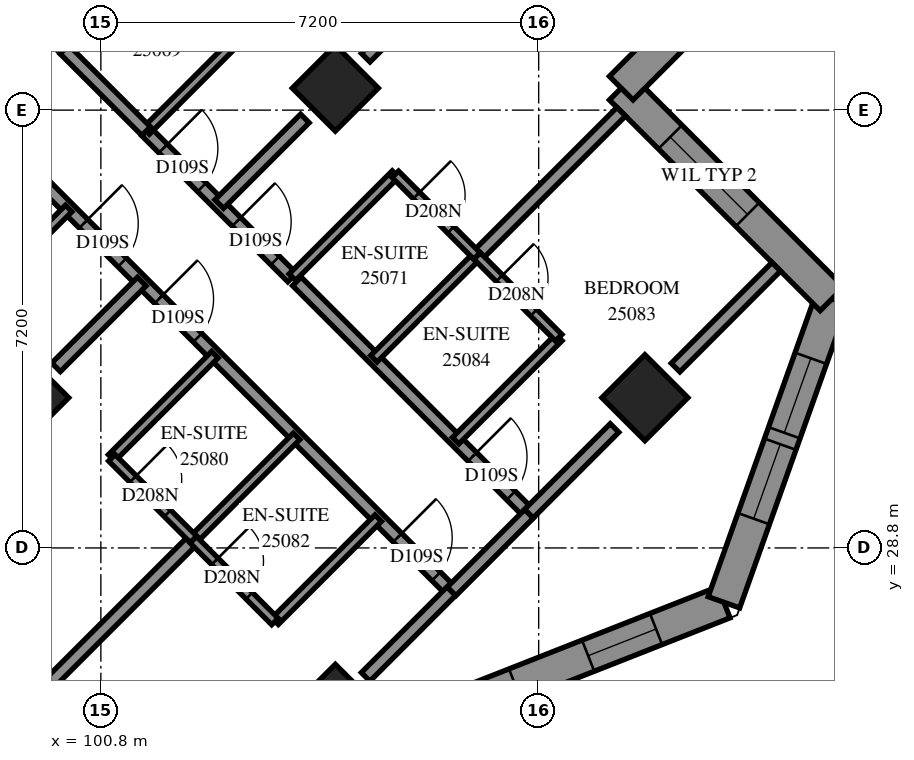
"""IFC4 building model, lengths in metres.
Left out: names, types, materials, properties, quantities, classifications, styles, units other than length and angle.
Written with IfcOpenShell. Run it as: python <this file> out.ifc"""

import sys

from ifc_helpers import new_model, si_unit, direction, frame, frame_2d, origin, origin_2d, place, context, subcontext, project, spatial, polyline, rectangle, outline, extrude, element, fill, save


model = new_model("IFC4")
c1 = context("Model", 3, precision=1e-05, world=origin(), true_north=direction((0.0, 1.0)))
c2 = subcontext(c1, "Body", "Model", "MODEL_VIEW")
j1 = project(units=[si_unit("LENGTHUNIT", "METRE"), si_unit("PLANEANGLEUNIT", "RADIAN")], contexts=[c1])
p1 = place(None, origin())
s1 = spatial("IfcSite", under=j1, at=p1, CompositionType="ELEMENT")
p2 = place(p1, origin())
s2 = spatial("IfcBuilding", under=s1, at=p2, CompositionType="ELEMENT")
p3 = place(p2, frame((0.0, 0.0, 94.8)))
s3 = spatial("IfcBuildingStorey", under=s2, at=p3, CompositionType="ELEMENT", Elevation=94.8)
for number, where, z_axis, x_axis in (
    (1, (104.656, 36.362, 0.0), (0.0, 0.0, 1.0), (0.707, -0.707, 0.0)),
    (2, (99.565, 31.271, 0.0), (0.0, 0.0, 1.0), (0.707, -0.707, 0.0)),
    (3, (109.747, 31.271, 0.0), (0.0, 0.0, 1.0), (0.707, -0.707, 0.0)),
    (4, (104.656, 26.18, 0.0), (0.0, 0.0, 1.0), (0.707, -0.707, 0.0)),
):
    element("IfcColumn", number, at=place(p3, frame(where, z_axis=z_axis, x_axis=x_axis)), inside=s3, PredefinedType="COLUMN", context=c2, shape_type="SweptSolid", body=[
        extrude(rectangle(XDim=1.0, YDim=1.0, at=origin_2d()), origin(), (0.0, 0.0, 1.0), 3.1),
    ])
p4 = place(p3, frame((105.921, 25.889, 0.0), z_axis=(0.0, 0.0, 1.0), x_axis=(0.9305394819, 0.3661915791, 0.0)))
e5 = element("IfcWall", 5, at=p4, inside=s3, PredefinedType="SOLIDWALL", context=c2, shape_type="SweptSolid", body=[
    extrude(outline(polyline([(0.12, -0.275), (5.633, -0.275), (5.383, 0.275), (-0.12, 0.275), (0.12, -0.275)])), origin(), (0.0, 0.0, 1.0), 3.1),
])
p5 = place(p4, frame((0.617, 0.0, 0.5)))
e6 = element("IfcOpeningElement", 6, at=p5, cuts=e5, PredefinedType="OPENING", context=c2, shape_type="SweptSolid", body=[
    extrude(rectangle(XDim=1.2, YDim=2.45, at=frame_2d((0.6, 1.225))), frame((0.0, 0.285, 0.0), z_axis=(0.0, -1.0, 0.0), x_axis=(1.0, 0.0, 0.0)), (0.0, 0.0, 1.0), 0.57),
])
p6 = place(p4, frame((3.108, 0.0, 0.5)))
e7 = element("IfcOpeningElement", 7, at=p6, cuts=e5, PredefinedType="OPENING", context=c2, shape_type="SweptSolid", body=[
    extrude(rectangle(XDim=1.2, YDim=2.45, at=frame_2d((0.6, 1.225))), frame((0.0, 0.285, 0.0), z_axis=(0.0, -1.0, 0.0), x_axis=(1.0, 0.0, 0.0)), (0.0, 0.0, 1.0), 0.57),
])
p7 = place(p3, frame((111.046, 27.906, 0.0), z_axis=(0.0, 0.0, 1.0), x_axis=(0.3355027217, 0.9420392368, 0.0)))
e8 = element("IfcWall", 8, at=p7, inside=s3, PredefinedType="SOLIDWALL", context=c2, shape_type="SweptSolid", body=[
    extrude(outline(polyline([(-0.125, -0.275), (5.471, -0.275), (5.123, 0.275), (0.125, 0.275), (-0.125, -0.275)])), origin(), (0.0, 0.0, 1.0), 3.1),
])
p8 = place(p7, frame((1.46, 0.0, 0.5)))
e9 = element("IfcOpeningElement", 9, at=p8, cuts=e8, PredefinedType="OPENING", context=c2, shape_type="SweptSolid", body=[
    extrude(rectangle(XDim=1.3, YDim=2.45, at=frame_2d((0.65, 1.225))), frame((0.0, 0.285, 0.0), z_axis=(0.0, -1.0, 0.0), x_axis=(1.0, 0.0, 0.0)), (0.0, 0.0, 1.0), 0.57),
])
p9 = place(p7, frame((2.96, 0.0, 0.5)))
e10 = element("IfcOpeningElement", 10, at=p9, cuts=e8, PredefinedType="OPENING", context=c2, shape_type="SweptSolid", body=[
    extrude(rectangle(XDim=1.3, YDim=2.45, at=frame_2d((0.65, 1.225))), frame((0.0, 0.285, 0.0), z_axis=(0.0, -1.0, 0.0), x_axis=(1.0, 0.0, 0.0)), (0.0, 0.0, 1.0), 0.57),
])
p10 = place(p3, frame((112.824, 32.896, 0.0), z_axis=(0.0, 0.0, 1.0), x_axis=(-0.7071067812, 0.7071067812, 0.0)))
e11 = element("IfcWall", 11, at=p10, inside=s3, PredefinedType="SOLIDWALL", context=c2, shape_type="SweptSolid", body=[
    extrude(outline(polyline([(-0.174, -0.275), (4.626, -0.275), (5.176, 0.275), (0.174, 0.275), (-0.174, -0.275)])), origin(), (0.0, 0.0, 1.0), 3.1),
])
p11 = place(p10, frame((1.964, 0.0, 0.6)))
e12 = element("IfcOpeningElement", 12, at=p11, cuts=e11, PredefinedType="OPENING", context=c2, shape_type="SweptSolid", body=[
    extrude(rectangle(XDim=1.8, YDim=1.9, at=frame_2d((0.9, 0.95))), frame((0.0, 0.285, 0.0), z_axis=(0.0, -1.0, 0.0), x_axis=(1.0, 0.0, 0.0)), (0.0, 0.0, 1.0), 0.57),
])
p12 = place(p3, frame((109.358, 36.362, 0.0), z_axis=(0.0, 0.0, 1.0), x_axis=(0.7071067812, 0.7071067812, 0.0)))
e13 = element("IfcWall", 13, at=p12, inside=s3, PredefinedType="SOLIDWALL", context=c2, shape_type="SweptSolid", body=[
    extrude(outline(polyline([(0.275, -0.275), (6.096, -0.275), (5.357, 0.275), (-0.275, 0.275), (0.275, -0.275)])), origin(), (0.0, 0.0, 1.0), 3.1),
])
p13 = place(p12, frame((1.137, 0.0, 0.6)))
e14 = element("IfcOpeningElement", 14, at=p13, cuts=e13, PredefinedType="OPENING", context=c2, shape_type="SweptSolid", body=[
    extrude(rectangle(XDim=1.8, YDim=1.9, at=frame_2d((0.9, 0.95))), frame((0.0, 0.285, 0.0), z_axis=(0.0, -1.0, 0.0), x_axis=(1.0, 0.0, 0.0)), (0.0, 0.0, 1.0), 0.57),
])
p14 = place(p3, frame((93.339, 41.309, 0.0), z_axis=(0.0, 0.0, 1.0), x_axis=(0.7071067812, -0.7071067812, 0.0)))
e15 = element("IfcWall", 15, at=p14, inside=s3, PredefinedType="PARTITIONING", context=c2, shape_type="SweptSolid", body=[
    extrude(rectangle(XDim=18.702, YDim=0.2, at=frame_2d((9.351, 0.0))), origin(), (0.0, 0.0, 1.0), 3.1),
])
p15 = place(p14, frame((3.05, 0.0, 0.0)))
e16 = element("IfcOpeningElement", 16, at=p15, cuts=e15, PredefinedType="OPENING", context=c2, shape_type="SweptSolid", body=[
    extrude(rectangle(XDim=0.9, YDim=2.1, at=frame_2d((0.45, 1.05))), frame((0.0, 0.11, 0.0), z_axis=(0.0, -1.0, 0.0), x_axis=(1.0, 0.0, 0.0)), (0.0, 0.0, 1.0), 0.22),
])
p16 = place(p14, frame((4.7, 0.0, 0.0)))
e17 = element("IfcOpeningElement", 17, at=p16, cuts=e15, PredefinedType="OPENING", context=c2, shape_type="SweptSolid", body=[
    extrude(rectangle(XDim=0.9, YDim=2.1, at=frame_2d((0.45, 1.05))), frame((0.0, 0.11, 0.0), z_axis=(0.0, -1.0, 0.0), x_axis=(1.0, 0.0, 0.0)), (0.0, 0.0, 1.0), 0.22),
])
p17 = place(p14, frame((10.149, 0.0, 0.0)))
e18 = element("IfcOpeningElement", 18, at=p17, cuts=e15, PredefinedType="OPENING", context=c2, shape_type="SweptSolid", body=[
    extrude(rectangle(XDim=0.9, YDim=2.1, at=frame_2d((0.45, 1.05))), frame((0.0, 0.11, 0.0), z_axis=(0.0, -1.0, 0.0), x_axis=(1.0, 0.0, 0.0)), (0.0, 0.0, 1.0), 0.22),
])
p18 = place(p14, frame((11.9, 0.0, 0.0)))
e19 = element("IfcOpeningElement", 19, at=p18, cuts=e15, PredefinedType="OPENING", context=c2, shape_type="SweptSolid", body=[
    extrude(rectangle(XDim=0.9, YDim=2.1, at=frame_2d((0.45, 1.05))), frame((0.0, 0.11, 0.0), z_axis=(0.0, -1.0, 0.0), x_axis=(1.0, 0.0, 0.0)), (0.0, 0.0, 1.0), 0.22),
])
p19 = place(p14, frame((17.45, 0.0, 0.0)))
e20 = element("IfcOpeningElement", 20, at=p19, cuts=e15, PredefinedType="OPENING", context=c2, shape_type="SweptSolid", body=[
    extrude(rectangle(XDim=0.9, YDim=2.1, at=frame_2d((0.45, 1.05))), frame((0.0, 0.11, 0.0), z_axis=(0.0, -1.0, 0.0), x_axis=(1.0, 0.0, 0.0)), (0.0, 0.0, 1.0), 0.22),
])
p20 = place(p3, frame((96.496, 23.113, 0.0), z_axis=(0.0, 0.0, 1.0), x_axis=(0.7071067812, 0.7071067812, 0.0)))
e21 = element("IfcWall", 21, at=p20, inside=s3, PredefinedType="PARTITIONING", context=c2, shape_type="SweptSolid", body=[
    extrude(rectangle(XDim=8.24, YDim=0.2, at=frame_2d((4.12, 0.0))), origin(), (0.0, 0.0, 1.0), 3.1),
])
p21 = place(p3, frame((94.62, 42.587, 0.0), z_axis=(0.0, 0.0, 1.0), x_axis=(0.7071067812, -0.7071067812, 0.0)))
e22 = element("IfcWall", 22, at=p21, inside=s3, PredefinedType="PARTITIONING", context=c2, shape_type="SweptSolid", body=[
    extrude(rectangle(XDim=7.9, YDim=0.2, at=frame_2d((3.95, 0.0))), origin(), (0.0, 0.0, 1.0), 3.1),
])
p22 = place(p21, frame((2.998, 0.0, 0.0)))
e23 = element("IfcOpeningElement", 23, at=p22, cuts=e22, PredefinedType="OPENING", context=c2, shape_type="SweptSolid", body=[
    extrude(rectangle(XDim=0.9, YDim=2.1, at=frame_2d((0.45, 1.05))), frame((0.0, 0.11, 0.0), z_axis=(0.0, -1.0, 0.0), x_axis=(1.0, 0.0, 0.0)), (0.0, 0.0, 1.0), 0.22),
])
p23 = place(p21, frame((4.649, 0.0, 0.0)))
e24 = element("IfcOpeningElement", 24, at=p23, cuts=e22, PredefinedType="OPENING", context=c2, shape_type="SweptSolid", body=[
    extrude(rectangle(XDim=0.9, YDim=2.1, at=frame_2d((0.45, 1.05))), frame((0.0, 0.11, 0.0), z_axis=(0.0, -1.0, 0.0), x_axis=(1.0, 0.0, 0.0)), (0.0, 0.0, 1.0), 0.22),
])
p24 = place(p3, frame((105.155, 36.863, 0.0), z_axis=(0.0, 0.0, 1.0), x_axis=(0.7071067812, 0.7071067812, 0.0)))
e25 = element("IfcWall", 25, at=p24, inside=s3, PredefinedType="PARTITIONING", context=c2, shape_type="SweptSolid", body=[
    extrude(rectangle(XDim=5.787, YDim=0.2, at=frame_2d((2.893, 0.0))), origin(), (0.0, 0.0, 1.0), 3.1),
])
p25 = place(p3, frame((104.023, 33.184, 0.0), z_axis=(0.0, 0.0, 1.0), x_axis=(0.7071067812, -0.7071067812, 0.0)))
e26 = element("IfcWall", 26, at=p25, inside=s3, PredefinedType="PARTITIONING", context=c2, shape_type="SweptSolid", body=[
    extrude(rectangle(XDim=5.399, YDim=0.2, at=frame_2d((2.7, 0.0))), origin(), (0.0, 0.0, 1.0), 3.1),
])
p26 = place(p25, frame((4.08, 0.0, 0.0)))
e27 = element("IfcOpeningElement", 27, at=p26, cuts=e26, PredefinedType="OPENING", context=c2, shape_type="SweptSolid", body=[
    extrude(rectangle(XDim=0.9, YDim=2.1, at=frame_2d((0.45, 1.05))), frame((0.0, 0.11, 0.0), z_axis=(0.0, -1.0, 0.0), x_axis=(1.0, 0.0, 0.0)), (0.0, 0.0, 1.0), 0.22),
])
p27 = place(p3, frame((101.541, 35.651, 0.0), z_axis=(0.0, 0.0, 1.0), x_axis=(0.7071067812, -0.7071067812, 0.0)))
e28 = element("IfcWall", 28, at=p27, inside=s3, PredefinedType="PARTITIONING", context=c2, shape_type="SweptSolid", body=[
    extrude(rectangle(XDim=3.4, YDim=0.2, at=frame_2d((1.7, 0.0))), origin(), (0.0, 0.0, 1.0), 3.1),
])
p28 = place(p27, frame((0.4, 0.0, 0.0)))
e29 = element("IfcOpeningElement", 29, at=p28, cuts=e28, PredefinedType="OPENING", context=c2, shape_type="SweptSolid", body=[
    extrude(rectangle(XDim=0.9, YDim=2.1, at=frame_2d((0.45, 1.05))), frame((0.0, 0.11, 0.0), z_axis=(0.0, -1.0, 0.0), x_axis=(1.0, 0.0, 0.0)), (0.0, 0.0, 1.0), 0.22),
])
p29 = place(p27, frame((2.105, 0.0, 0.0)))
e30 = element("IfcOpeningElement", 30, at=p29, cuts=e28, PredefinedType="OPENING", context=c2, shape_type="SweptSolid", body=[
    extrude(rectangle(XDim=0.9, YDim=2.1, at=frame_2d((0.45, 1.05))), frame((0.0, 0.11, 0.0), z_axis=(0.0, -1.0, 0.0), x_axis=(1.0, 0.0, 0.0)), (0.0, 0.0, 1.0), 0.22),
])
p30 = place(p3, frame((106.989, 33.605, 0.0), z_axis=(0.0, 0.0, 1.0), x_axis=(0.7071067812, 0.7071067812, 0.0)))
e31 = element("IfcWall", 31, at=p30, inside=s3, PredefinedType="PARTITIONING", context=c2, shape_type="SweptSolid", body=[
    extrude(rectangle(XDim=3.35, YDim=0.2, at=frame_2d((1.675, 0.0))), origin(), (0.0, 0.0, 1.0), 3.1),
])
for number, where, z_axis, x_axis in (
    (32, (100.977, 30.281, 0.0), (0.0, 0.0, 1.0), (0.707, 0.707, 0.0)),
    (33, (98.573, 32.685, 0.0), (0.0, 0.0, 1.0), (0.707, 0.707, 0.0)),
):
    element("IfcWall", number, at=place(p3, frame(where, z_axis=z_axis, x_axis=x_axis)), inside=s3, PredefinedType="PARTITIONING", context=c2, shape_type="SweptSolid", body=[
        extrude(rectangle(XDim=2.401, YDim=0.15, at=frame_2d((1.201, 0.0))), origin(), (0.0, 0.0, 1.0), 3.1),
    ])
for number, where, z_axis, x_axis in (
    (34, (100.203, 36.997, 0.0), (0.0, 0.0, 1.0), (0.707, 0.708, 0.0)),
    (35, (105.29, 31.91, 0.0), (0.0, 0.0, 1.0), (0.708, 0.707, 0.0)),
):
    element("IfcWall", number, at=place(p3, frame(where, z_axis=z_axis, x_axis=x_axis)), inside=s3, PredefinedType="PARTITIONING", context=c2, shape_type="SweptSolid", body=[
        extrude(rectangle(XDim=2.4, YDim=0.15, at=frame_2d((1.2, 0.0))), origin(), (0.0, 0.0, 1.0), 3.1),
    ])
for number, where, z_axis, x_axis in (
    (36, (101.545, 35.657, 0.0), (0.0, 0.0, 1.0), (0.707, 0.707, 0.0)),
    (37, (102.323, 28.939, 0.0), (0.0, 0.0, 1.0), (0.707, 0.707, 0.0)),
    (38, (103.665, 27.595, 0.0), (0.0, 0.0, 1.0), (0.707, 0.707, 0.0)),
    (39, (106.635, 30.565, 0.0), (0.0, 0.0, 1.0), (0.707, 0.707, 0.0)),
    (40, (103.949, 33.253, 0.0), (0.0, 0.0, 1.0), (0.707, 0.707, 0.0)),
):
    element("IfcWall", number, at=place(p3, frame(where, z_axis=z_axis, x_axis=x_axis)), inside=s3, PredefinedType="PARTITIONING", context=c2, shape_type="SweptSolid", body=[
        extrude(rectangle(XDim=2.398, YDim=0.15, at=frame_2d((1.199, 0.0))), origin(), (0.0, 0.0, 1.0), 3.1),
    ])
p31 = place(p3, frame((110.251, 31.767, 0.0), z_axis=(0.0, 0.0, 1.0), x_axis=(0.7066584143, 0.7075548639, 0.0)))
e41 = element("IfcWall", 41, at=p31, inside=s3, PredefinedType="PARTITIONING", context=c2, shape_type="SweptSolid", body=[
    extrude(rectangle(XDim=2.343, YDim=0.2, at=frame_2d((1.171, 0.0))), origin(), (0.0, 0.0, 1.0), 3.1),
])
p32 = place(p3, frame((100.063, 31.771, 0.0), z_axis=(0.0, 0.0, 1.0), x_axis=(0.7071067812, 0.7071067812, 0.0)))
e42 = element("IfcWall", 42, at=p32, inside=s3, PredefinedType="PARTITIONING", context=c2, shape_type="SweptSolid", body=[
    extrude(rectangle(XDim=1.994, YDim=0.2, at=frame_2d((0.997, 0.0))), origin(), (0.0, 0.0, 1.0), 3.1),
])
for number, where, z_axis, x_axis in (
    (43, (107.837, 29.363, 0.0), (0.0, 0.0, 1.0), (0.707, 0.707, 0.0)),
    (44, (105.154, 26.68, 0.0), (0.0, 0.0, 1.0), (0.707, 0.707, 0.0)),
):
    element("IfcWall", number, at=place(p3, frame(where, z_axis=z_axis, x_axis=x_axis)), inside=s3, PredefinedType="PARTITIONING", context=c2, shape_type="SweptSolid", body=[
        extrude(rectangle(XDim=1.994, YDim=0.2, at=frame_2d((0.997, 0.0))), origin(), (0.0, 0.0, 1.0), 2.6),
    ])
p33 = place(p3, frame((102.747, 34.455, 0.0), z_axis=(0.0, 0.0, 1.0), x_axis=(0.7071067812, 0.7071067812, 0.0)))
e45 = element("IfcWall", 45, at=p33, inside=s3, PredefinedType="PARTITIONING", context=c2, shape_type="SweptSolid", body=[
    extrude(rectangle(XDim=1.991, YDim=0.2, at=frame_2d((0.996, 0.0))), origin(), (0.0, 0.0, 1.0), 3.1),
])
p34 = place(p3, frame((105.642, 34.944, 0.0), z_axis=(0.0, 0.0, 1.0), x_axis=(0.7071067812, -0.7071067812, 0.0)))
e46 = element("IfcWall", 46, at=p34, inside=s3, PredefinedType="PARTITIONING", context=c2, shape_type="SweptSolid", body=[
    extrude(rectangle(XDim=1.901, YDim=0.15, at=frame_2d((0.95, 0.0))), origin(), (0.0, 0.0, 1.0), 3.1),
])
p35 = place(p34, frame((0.491, 0.0, 0.0)))
e47 = element("IfcOpeningElement", 47, at=p35, cuts=e46, PredefinedType="OPENING", context=c2, shape_type="SweptSolid", body=[
    extrude(rectangle(XDim=0.8, YDim=2.1, at=frame_2d((0.4, 1.05))), frame((0.0, 0.085, 0.0), z_axis=(0.0, -1.0, 0.0), x_axis=(1.0, 0.0, 0.0)), (0.0, 0.0, 1.0), 0.17),
])
p36 = place(p3, frame((100.981, 30.283, 0.0), z_axis=(0.0, 0.0, 1.0), x_axis=(0.7076330979, -0.7065800724, 0.0)))
e48 = element("IfcWall", 48, at=p36, inside=s3, PredefinedType="PARTITIONING", context=c2, shape_type="SweptSolid", body=[
    extrude(rectangle(XDim=1.899, YDim=0.15, at=frame_2d((0.95, 0.0))), origin(), (0.0, 0.0, 1.0), 3.1),
])
p37 = place(p36, frame((0.493, 0.0, 0.0)))
e49 = element("IfcOpeningElement", 49, at=p37, cuts=e48, PredefinedType="OPENING", context=c2, shape_type="SweptSolid", body=[
    extrude(rectangle(XDim=0.8, YDim=2.1, at=frame_2d((0.4, 1.05))), frame((0.0, 0.085, 0.0), z_axis=(0.0, -1.0, 0.0), x_axis=(1.0, 0.0, 0.0)), (0.0, 0.0, 1.0), 0.17),
])
p38 = place(p3, frame((100.201, 36.997, 0.0), z_axis=(0.0, 0.0, 1.0), x_axis=(0.7076330979, -0.7065800724, 0.0)))
e50 = element("IfcWall", 50, at=p38, inside=s3, PredefinedType="PARTITIONING", context=c2, shape_type="SweptSolid", body=[
    extrude(rectangle(XDim=1.899, YDim=0.2, at=frame_2d((0.95, 0.0))), origin(), (0.0, 0.0, 1.0), 3.1),
])
p39 = place(p3, frame((102.321, 28.935, 0.0), z_axis=(0.0, 0.0, 1.0), x_axis=(0.7065800724, -0.7076330979, 0.0)))
e51 = element("IfcWall", 51, at=p39, inside=s3, PredefinedType="PARTITIONING", context=c2, shape_type="SweptSolid", body=[
    extrude(rectangle(XDim=1.899, YDim=0.15, at=frame_2d((0.95, 0.0))), origin(), (0.0, 0.0, 1.0), 3.1),
])
p40 = place(p39, frame((0.501, 0.0, 0.0)))
e52 = element("IfcOpeningElement", 52, at=p40, cuts=e51, PredefinedType="OPENING", context=c2, shape_type="SweptSolid", body=[
    extrude(rectangle(XDim=0.8, YDim=2.1, at=frame_2d((0.4, 1.05))), frame((0.0, 0.085, 0.0), z_axis=(0.0, -1.0, 0.0), x_axis=(1.0, 0.0, 0.0)), (0.0, 0.0, 1.0), 0.17),
])
p41 = place(p3, frame((106.987, 33.602, 0.0), z_axis=(0.0, 0.0, 1.0), x_axis=(0.7065800724, -0.7076330979, 0.0)))
e53 = element("IfcWall", 53, at=p41, inside=s3, PredefinedType="PARTITIONING", context=c2, shape_type="SweptSolid", body=[
    extrude(rectangle(XDim=1.899, YDim=0.15, at=frame_2d((0.95, 0.0))), origin(), (0.0, 0.0, 1.0), 3.1),
])
p42 = place(p41, frame((0.519, 0.0, 0.0)))
e54 = element("IfcOpeningElement", 54, at=p42, cuts=e53, PredefinedType="OPENING", context=c2, shape_type="SweptSolid", body=[
    extrude(rectangle(XDim=0.8, YDim=2.1, at=frame_2d((0.4, 1.05))), frame((0.0, 0.085, 0.0), z_axis=(0.0, -1.0, 0.0), x_axis=(1.0, 0.0, 0.0)), (0.0, 0.0, 1.0), 0.17),
])
p43 = place(p3, frame((106.568, 28.086, 0.0), z_axis=(0.0, 0.0, 1.0), x_axis=(0.7065510983, 0.7076620277, 0.0)))
e55 = element("IfcWall", 55, at=p43, inside=s3, PredefinedType="PARTITIONING", context=c2, shape_type="SweptSolid", body=[
    extrude(rectangle(XDim=1.8, YDim=0.2, at=frame_2d((0.9, 0.0))), origin(), (0.0, 0.0, 1.0), 2.6),
])
p44 = place(p5, origin())
e56 = element("IfcWindow", 56, at=p44, inside=s3, PartitioningType="SINGLE_PANEL", PredefinedType="WINDOW", context=c2, shape_type="SweptSolid", body=[
    extrude(rectangle(XDim=1.2, YDim=2.45, at=frame_2d((0.6, 1.225))), frame((0.0, 0.155, 0.0), z_axis=(0.0, -1.0, 0.0), x_axis=(1.0, 0.0, 0.0)), (0.0, 0.0, 1.0), 0.06),
])
fill(e6, e56)
p45 = place(p6, origin())
e57 = element("IfcWindow", 57, at=p45, inside=s3, PartitioningType="SINGLE_PANEL", PredefinedType="WINDOW", context=c2, shape_type="SweptSolid", body=[
    extrude(rectangle(XDim=1.2, YDim=2.45, at=frame_2d((0.6, 1.225))), frame((0.0, 0.155, 0.0), z_axis=(0.0, -1.0, 0.0), x_axis=(1.0, 0.0, 0.0)), (0.0, 0.0, 1.0), 0.06),
])
fill(e7, e57)
p46 = place(p8, origin())
e58 = element("IfcWindow", 58, at=p46, inside=s3, PartitioningType="SINGLE_PANEL", PredefinedType="WINDOW", context=c2, shape_type="SweptSolid", body=[
    extrude(rectangle(XDim=1.3, YDim=2.45, at=frame_2d((0.65, 1.225))), frame((0.0, 0.155, 0.0), z_axis=(0.0, -1.0, 0.0), x_axis=(1.0, 0.0, 0.0)), (0.0, 0.0, 1.0), 0.06),
])
fill(e9, e58)
p47 = place(p9, origin())
e59 = element("IfcWindow", 59, at=p47, inside=s3, PartitioningType="SINGLE_PANEL", PredefinedType="WINDOW", context=c2, shape_type="SweptSolid", body=[
    extrude(rectangle(XDim=1.3, YDim=2.45, at=frame_2d((0.65, 1.225))), frame((0.0, 0.155, 0.0), z_axis=(0.0, -1.0, 0.0), x_axis=(1.0, 0.0, 0.0)), (0.0, 0.0, 1.0), 0.06),
])
fill(e10, e59)
p48 = place(p11, origin())
e60 = element("IfcWindow", 60, at=p48, inside=s3, PartitioningType="SINGLE_PANEL", PredefinedType="WINDOW", context=c2, shape_type="SweptSolid", body=[
    extrude(rectangle(XDim=1.8, YDim=1.9, at=frame_2d((0.9, 0.95))), frame((0.0, 0.155, 0.0), z_axis=(0.0, -1.0, 0.0), x_axis=(1.0, 0.0, 0.0)), (0.0, 0.0, 1.0), 0.06),
])
fill(e12, e60)
p49 = place(p28, origin())
e61 = element("IfcDoor", 61, at=p49, inside=s3, OperationType="SINGLE_SWING_RIGHT", PredefinedType="DOOR", context=c2, shape_type="SweptSolid", body=[
    extrude(rectangle(XDim=0.9, YDim=2.1, at=frame_2d((0.45, 1.05))), frame((0.0, 0.025, 0.0), z_axis=(0.0, -1.0, 0.0), x_axis=(1.0, 0.0, 0.0)), (0.0, 0.0, 1.0), 0.05),
])
fill(e29, e61)
p50 = place(p29, origin())
e62 = element("IfcDoor", 62, at=p50, inside=s3, OperationType="SINGLE_SWING_LEFT", PredefinedType="DOOR", context=c2, shape_type="SweptSolid", body=[
    extrude(rectangle(XDim=0.9, YDim=2.1, at=frame_2d((0.45, 1.05))), frame((0.0, 0.025, 0.0), z_axis=(0.0, -1.0, 0.0), x_axis=(1.0, 0.0, 0.0)), (0.0, 0.0, 1.0), 0.05),
])
fill(e30, e62)
p51 = place(p35, origin())
e63 = element("IfcDoor", 63, at=p51, inside=s3, OperationType="SINGLE_SWING_RIGHT", PredefinedType="DOOR", context=c2, shape_type="SweptSolid", body=[
    extrude(rectangle(XDim=0.8, YDim=2.1, at=frame_2d((0.4, 1.05))), frame((0.0, 0.025, 0.0), z_axis=(0.0, -1.0, 0.0), x_axis=(1.0, 0.0, 0.0)), (0.0, 0.0, 1.0), 0.05),
])
fill(e47, e63)
p52 = place(p17, origin())
e64 = element("IfcDoor", 64, at=p52, inside=s3, OperationType="SINGLE_SWING_LEFT", PredefinedType="DOOR", context=c2, shape_type="SweptSolid", body=[
    extrude(rectangle(XDim=0.9, YDim=2.1, at=frame_2d((0.45, 1.05))), frame((0.0, 0.025, 0.0), z_axis=(0.0, -1.0, 0.0), x_axis=(1.0, 0.0, 0.0)), (0.0, 0.0, 1.0), 0.05),
])
fill(e18, e64)
p53 = place(p18, origin())
e65 = element("IfcDoor", 65, at=p53, inside=s3, OperationType="SINGLE_SWING_RIGHT", PredefinedType="DOOR", context=c2, shape_type="SweptSolid", body=[
    extrude(rectangle(XDim=0.9, YDim=2.1, at=frame_2d((0.45, 1.05))), frame((0.0, 0.025, 0.0), z_axis=(0.0, -1.0, 0.0), x_axis=(1.0, 0.0, 0.0)), (0.0, 0.0, 1.0), 0.05),
])
fill(e19, e65)
p54 = place(p37, origin())
e66 = element("IfcDoor", 66, at=p54, inside=s3, OperationType="SINGLE_SWING_RIGHT", PredefinedType="DOOR", context=c2, shape_type="SweptSolid", body=[
    extrude(rectangle(XDim=0.8, YDim=2.1, at=frame_2d((0.4, 1.05))), frame((0.0, 0.025, 0.0), z_axis=(0.0, -1.0, 0.0), x_axis=(1.0, 0.0, 0.0)), (0.0, 0.0, 1.0), 0.05),
])
fill(e49, e66)
p55 = place(p19, origin())
e67 = element("IfcDoor", 67, at=p55, inside=s3, OperationType="SINGLE_SWING_LEFT", PredefinedType="DOOR", context=c2, shape_type="SweptSolid", body=[
    extrude(rectangle(XDim=0.9, YDim=2.1, at=frame_2d((0.45, 1.05))), frame((0.0, 0.025, 0.0), z_axis=(0.0, -1.0, 0.0), x_axis=(1.0, 0.0, 0.0)), (0.0, 0.0, 1.0), 0.05),
])
fill(e20, e67)
p56 = place(p40, origin())
e68 = element("IfcDoor", 68, at=p56, inside=s3, OperationType="SINGLE_SWING_RIGHT", PredefinedType="DOOR", context=c2, shape_type="SweptSolid", body=[
    extrude(rectangle(XDim=0.8, YDim=2.1, at=frame_2d((0.4, 1.05))), frame((0.0, 0.025, 0.0), z_axis=(0.0, -1.0, 0.0), x_axis=(1.0, 0.0, 0.0)), (0.0, 0.0, 1.0), 0.05),
])
fill(e52, e68)
p57 = place(p26, origin())
e69 = element("IfcDoor", 69, at=p57, inside=s3, OperationType="SINGLE_SWING_RIGHT", PredefinedType="DOOR", context=c2, shape_type="SweptSolid", body=[
    extrude(rectangle(XDim=0.9, YDim=2.1, at=frame_2d((0.45, 1.05))), frame((0.0, 0.025, 0.0), z_axis=(0.0, -1.0, 0.0), x_axis=(1.0, 0.0, 0.0)), (0.0, 0.0, 1.0), 0.05),
])
fill(e27, e69)
p58 = place(p42, origin())
e70 = element("IfcDoor", 70, at=p58, inside=s3, OperationType="SINGLE_SWING_RIGHT", PredefinedType="DOOR", context=c2, shape_type="SweptSolid", body=[
    extrude(rectangle(XDim=0.8, YDim=2.1, at=frame_2d((0.4, 1.05))), frame((0.0, 0.025, 0.0), z_axis=(0.0, -1.0, 0.0), x_axis=(1.0, 0.0, 0.0)), (0.0, 0.0, 1.0), 0.05),
])
fill(e54, e70)
save(model, sys.argv[1])
